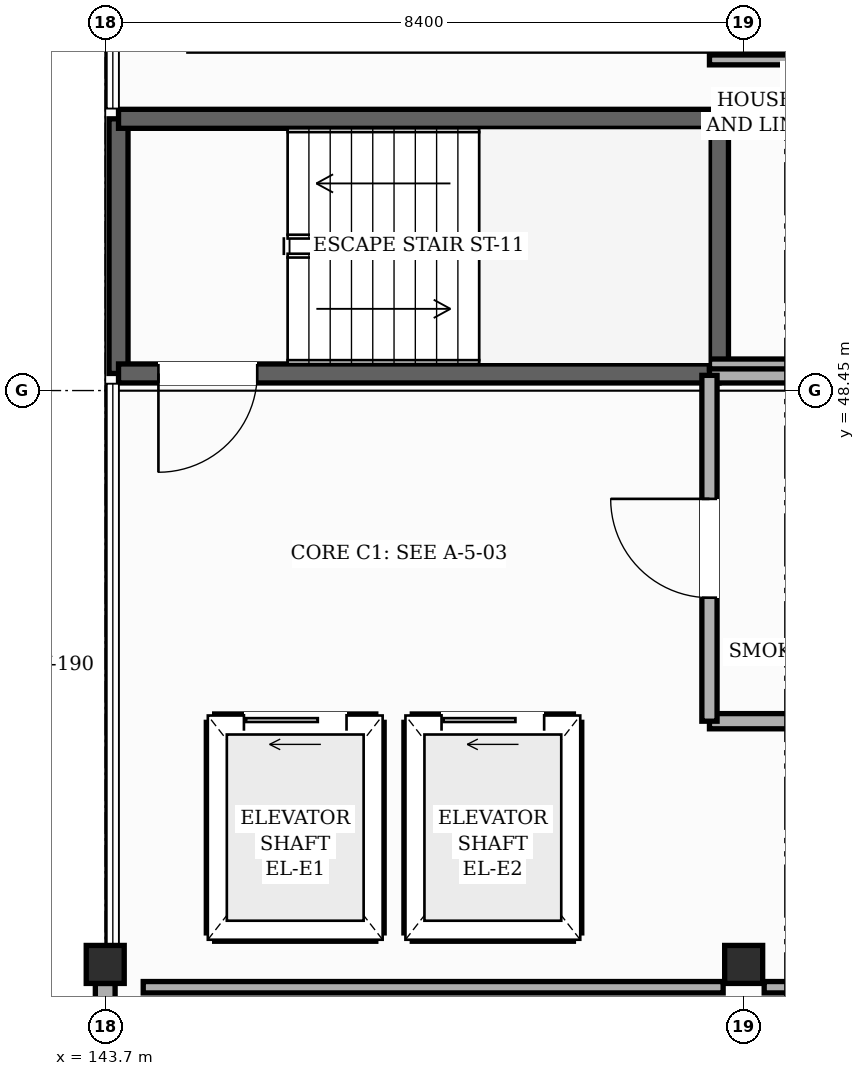
"""IFC4 building model, lengths in metres.
Left out: names, types, materials, properties, quantities, classifications, styles, units other than length and angle.
Written with IfcOpenShell. Run it as: python <this file> out.ifc"""

import sys

from ifc_helpers import new_model, si_unit, direction, frame, frame_2d, origin, origin_2d, place, context, subcontext, project, spatial, rectangle, hollow_rectangle, extrude, element, fill, save


model = new_model("IFC4")
c1 = context("Model", 3, precision=1e-05, world=origin(), true_north=direction((0.0, 1.0)))
c2 = subcontext(c1, "Body", "Model", "MODEL_VIEW")
j1 = project(units=[si_unit("LENGTHUNIT", "METRE"), si_unit("PLANEANGLEUNIT", "RADIAN")], contexts=[c1])
p1 = place(None, origin())
s1 = spatial("IfcSite", under=j1, at=p1, CompositionType="ELEMENT")
p2 = place(p1, origin())
s2 = spatial("IfcBuilding", under=s1, at=p2, CompositionType="ELEMENT")
p3 = place(p2, frame((0.0, 0.0, 39.0)))
s3 = spatial("IfcBuildingStorey", under=s2, at=p3, CompositionType="ELEMENT", Elevation=39.0)
for number, where, z_axis, x_axis in (
    (1, (143.7, 40.9, 0.0), (0.0, 0.0, 1.0), (1.0, 0.0, 0.0)),
    (2, (152.1, 40.9, 0.0), (0.0, 0.0, 1.0), (1.0, 0.0, 0.0)),
):
    element("IfcColumn", number, at=place(p3, frame(where, z_axis=z_axis, x_axis=x_axis)), inside=s3, PredefinedType="COLUMN", context=c2, shape_type="SweptSolid", body=[
        extrude(hollow_rectangle(XDim=0.5, YDim=0.5, WallThickness=0.022, InnerFilletRadius=0.022, OuterFilletRadius=0.044, at=origin_2d()), origin(), (0.0, 0.0, 1.0), 3.6),
    ])
p4 = place(p3, frame((143.7, 32.25, 0.0), z_axis=(0.0, 0.0, 1.0), x_axis=(0.0, 1.0, 0.0)))
e3 = element("IfcWall", 3, at=p4, inside=s3, PredefinedType="SOLIDWALL", context=c2, shape_type="SweptSolid", body=[
    extrude(rectangle(XDim=8.4, YDim=0.26, at=frame_2d((4.2, 0.0))), origin(), (0.0, 0.0, 1.0), 2.655),
])
p5 = place(p4, frame((0.35, 0.0, 0.85)))
e4 = element("IfcOpeningElement", 4, at=p5, cuts=e3, PredefinedType="OPENING", context=c2, shape_type="SweptSolid", body=[
    extrude(rectangle(XDim=0.85, YDim=1.35, at=frame_2d((0.425, 0.675))), frame((0.0, 0.14, 0.0), z_axis=(0.0, -1.0, 0.0), x_axis=(1.0, 0.0, 0.0)), (0.0, 0.0, 1.0), 0.28),
])
p6 = place(p4, frame((2.375, 0.0, 0.85)))
e5 = element("IfcOpeningElement", 5, at=p6, cuts=e3, PredefinedType="OPENING", context=c2, shape_type="SweptSolid", body=[
    extrude(rectangle(XDim=1.75, YDim=1.35, at=frame_2d((0.875, 0.675))), frame((0.0, 0.14, 0.0), z_axis=(0.0, -1.0, 0.0), x_axis=(1.0, 0.0, 0.0)), (0.0, 0.0, 1.0), 0.28),
])
p7 = place(p4, frame((5.675, 0.0, 0.85)))
e6 = element("IfcOpeningElement", 6, at=p7, cuts=e3, PredefinedType="OPENING", context=c2, shape_type="SweptSolid", body=[
    extrude(rectangle(XDim=1.95, YDim=1.35, at=frame_2d((0.975, 0.675))), frame((0.0, 0.14, 0.0), z_axis=(0.0, -1.0, 0.0), x_axis=(1.0, 0.0, 0.0)), (0.0, 0.0, 1.0), 0.28),
])
for number, where, z_axis, x_axis in (
    (7, (143.875, 48.675, 0.0), (0.0, 0.0, 1.0), (0.0, 1.0, 0.0)),
    (8, (151.775, 52.025, 0.0), (0.0, 0.0, 1.0), (0.0, -1.0, 0.0)),
):
    element("IfcWall", number, at=place(p3, frame(where, z_axis=z_axis, x_axis=x_axis)), inside=s3, PredefinedType="SHEAR", context=c2, shape_type="SweptSolid", body=[
        extrude(rectangle(XDim=3.35, YDim=0.25, at=frame_2d((1.675, 0.0))), origin(), (0.0, 0.0, 1.0), 3.38),
    ])
p8 = place(p3, frame((151.775, 48.675, 0.0), z_axis=(0.0, 0.0, 1.0), x_axis=(-1.0, 0.0, 0.0)))
e9 = element("IfcWall", 9, at=p8, inside=s3, PredefinedType="SHEAR", context=c2, shape_type="SweptSolid", body=[
    extrude(rectangle(XDim=7.9, YDim=0.25, at=frame_2d((3.95, 0.0))), origin(), (0.0, 0.0, 1.0), 3.38),
])
p9 = place(p8, frame((6.075, 0.0, 0.0)))
e10 = element("IfcOpeningElement", 10, at=p9, cuts=e9, PredefinedType="OPENING", context=c2, shape_type="SweptSolid", body=[
    extrude(rectangle(XDim=1.3, YDim=2.2, at=frame_2d((0.65, 1.1))), frame((0.0, 0.135, 0.0), z_axis=(0.0, -1.0, 0.0), x_axis=(1.0, 0.0, 0.0)), (0.0, 0.0, 1.0), 0.27),
])
p10 = place(p3, frame((143.875, 52.025, 0.0), z_axis=(0.0, 0.0, 1.0), x_axis=(1.0, 0.0, 0.0)))
e11 = element("IfcWall", 11, at=p10, inside=s3, PredefinedType="SHEAR", context=c2, shape_type="SweptSolid", body=[
    extrude(rectangle(XDim=7.9, YDim=0.25, at=frame_2d((3.95, 0.0))), origin(), (0.0, 0.0, 1.0), 3.38),
])
p11 = place(p3, frame((145.14, 44.085, 0.0), z_axis=(0.0, 0.0, 1.0), x_axis=(1.0, 0.0, 0.0)))
e12 = element("IfcWall", 12, at=p11, inside=s3, PredefinedType="SHEAR", context=c2, shape_type="SweptSolid", body=[
    extrude(rectangle(XDim=2.12, YDim=0.22, at=frame_2d((1.06, 0.0))), origin(), (0.0, 0.0, 1.0), 3.38),
])
p12 = place(p11, frame((0.385, 0.0, 0.0)))
e13 = element("IfcOpeningElement", 13, at=p12, cuts=e12, PredefinedType="OPENING", context=c2, shape_type="SweptSolid", body=[
    extrude(rectangle(XDim=1.35, YDim=2.3, at=frame_2d((0.675, 1.15))), frame((0.0, 0.12, 0.0), z_axis=(0.0, -1.0, 0.0), x_axis=(1.0, 0.0, 0.0)), (0.0, 0.0, 1.0), 0.24),
])
p13 = place(p3, frame((145.14, 41.315, 0.0), z_axis=(0.0, 0.0, 1.0), x_axis=(1.0, 0.0, 0.0)))
e14 = element("IfcWall", 14, at=p13, inside=s3, PredefinedType="SHEAR", context=c2, shape_type="SweptSolid", body=[
    extrude(rectangle(XDim=2.12, YDim=0.22, at=frame_2d((1.06, 0.0))), origin(), (0.0, 0.0, 1.0), 3.38),
])
for number, where, z_axis, x_axis in (
    (15, (147.26, 41.315, 0.0), (0.0, 0.0, 1.0), (0.0, 1.0, 0.0)),
    (16, (145.14, 41.315, 0.0), (0.0, 0.0, 1.0), (0.0, 1.0, 0.0)),
):
    element("IfcWall", number, at=place(p3, frame(where, z_axis=z_axis, x_axis=x_axis)), inside=s3, PredefinedType="SHEAR", context=c2, shape_type="SweptSolid", body=[
        extrude(rectangle(XDim=2.77, YDim=0.22, at=frame_2d((1.385, 0.0))), origin(), (0.0, 0.0, 1.0), 3.38),
    ])
p14 = place(p3, frame((147.74, 44.085, 0.0), z_axis=(0.0, 0.0, 1.0), x_axis=(1.0, 0.0, 0.0)))
e17 = element("IfcWall", 17, at=p14, inside=s3, PredefinedType="SHEAR", context=c2, shape_type="SweptSolid", body=[
    extrude(rectangle(XDim=2.12, YDim=0.22, at=frame_2d((1.06, 0.0))), origin(), (0.0, 0.0, 1.0), 3.38),
])
p15 = place(p14, frame((0.385, 0.0, 0.0)))
e18 = element("IfcOpeningElement", 18, at=p15, cuts=e17, PredefinedType="OPENING", context=c2, shape_type="SweptSolid", body=[
    extrude(rectangle(XDim=1.35, YDim=2.3, at=frame_2d((0.675, 1.15))), frame((0.0, 0.12, 0.0), z_axis=(0.0, -1.0, 0.0), x_axis=(1.0, 0.0, 0.0)), (0.0, 0.0, 1.0), 0.24),
])
p16 = place(p3, frame((147.74, 41.315, 0.0), z_axis=(0.0, 0.0, 1.0), x_axis=(1.0, 0.0, 0.0)))
e19 = element("IfcWall", 19, at=p16, inside=s3, PredefinedType="SHEAR", context=c2, shape_type="SweptSolid", body=[
    extrude(rectangle(XDim=2.12, YDim=0.22, at=frame_2d((1.06, 0.0))), origin(), (0.0, 0.0, 1.0), 3.38),
])
for number, where, z_axis, x_axis in (
    (20, (149.86, 41.315, 0.0), (0.0, 0.0, 1.0), (0.0, 1.0, 0.0)),
    (21, (147.74, 41.315, 0.0), (0.0, 0.0, 1.0), (0.0, 1.0, 0.0)),
):
    element("IfcWall", number, at=place(p3, frame(where, z_axis=z_axis, x_axis=x_axis)), inside=s3, PredefinedType="SHEAR", context=c2, shape_type="SweptSolid", body=[
        extrude(rectangle(XDim=2.77, YDim=0.22, at=frame_2d((1.385, 0.0))), origin(), (0.0, 0.0, 1.0), 3.38),
    ])
p17 = place(p3, frame((144.2, 40.6, 0.0), z_axis=(0.0, 0.0, 1.0), x_axis=(1.0, 0.0, 0.0)))
e22 = element("IfcWall", 22, at=p17, inside=s3, PredefinedType="PARTITIONING", context=c2, shape_type="SweptSolid", body=[
    extrude(rectangle(XDim=7.63, YDim=0.15, at=frame_2d((3.815, 0.0))), origin(), (0.0, 0.0, 1.0), 2.755),
])
p18 = place(p3, frame((152.37, 40.6, 0.0), z_axis=(0.0, 0.0, 1.0), x_axis=(1.0, 0.0, 0.0)))
e23 = element("IfcWall", 23, at=p18, inside=s3, PredefinedType="PARTITIONING", context=c2, shape_type="SweptSolid", body=[
    extrude(rectangle(XDim=2.83, YDim=0.15, at=frame_2d((1.415, 0.0))), origin(), (0.0, 0.0, 1.0), 2.755),
])
for number, where, z_axis, x_axis in (
    (24, (151.65, 44.1, 0.0), (0.0, 0.0, 1.0), (1.0, 0.0, 0.0)),
    (25, (151.65, 48.65, 0.0), (0.0, 0.0, 1.0), (1.0, 0.0, 0.0)),
):
    element("IfcWall", number, at=place(p3, frame(where, z_axis=z_axis, x_axis=x_axis)), inside=s3, PredefinedType="SOLIDWALL", context=c2, shape_type="SweptSolid", body=[
        extrude(rectangle(XDim=3.55, YDim=0.2, at=frame_2d((1.775, 0.0))), origin(), (0.0, 0.0, 1.0), 3.365),
    ])
for number, where, z_axis, x_axis in (
    (26, (151.65, 48.8, 0.0), (0.0, 0.0, 1.0), (1.0, 0.0, 0.0)),
    (27, (151.65, 52.8, 0.0), (0.0, 0.0, 1.0), (1.0, 0.0, 0.0)),
):
    element("IfcWall", number, at=place(p3, frame(where, z_axis=z_axis, x_axis=x_axis)), inside=s3, PredefinedType="PARTITIONING", context=c2, shape_type="SweptSolid", body=[
        extrude(rectangle(XDim=3.55, YDim=0.13, at=frame_2d((1.775, 0.0))), origin(), (0.0, 0.0, 1.0), 3.365),
    ])
p19 = place(p3, frame((151.65, 44.1, 0.0), z_axis=(0.0, 0.0, 1.0), x_axis=(0.0, 1.0, 0.0)))
e28 = element("IfcWall", 28, at=p19, inside=s3, PredefinedType="SOLIDWALL", context=c2, shape_type="SweptSolid", body=[
    extrude(rectangle(XDim=4.55, YDim=0.2, at=frame_2d((2.275, 0.0))), origin(), (0.0, 0.0, 1.0), 3.365),
])
p20 = place(p19, frame((1.625, 0.0, 0.0)))
e29 = element("IfcOpeningElement", 29, at=p20, cuts=e28, PredefinedType="OPENING", context=c2, shape_type="SweptSolid", body=[
    extrude(rectangle(XDim=1.3, YDim=2.2, at=frame_2d((0.65, 1.1))), frame((0.0, 0.11, 0.0), z_axis=(0.0, -1.0, 0.0), x_axis=(1.0, 0.0, 0.0)), (0.0, 0.0, 1.0), 0.22),
])
p21 = place(p9, origin())
e30 = element("IfcDoor", 30, at=p21, inside=s3, OperationType="SINGLE_SWING_RIGHT", PredefinedType="DOOR", context=c2, shape_type="SweptSolid", body=[
    extrude(rectangle(XDim=1.3, YDim=2.2, at=frame_2d((0.65, 1.1))), frame((0.0, 0.025, 0.0), z_axis=(0.0, -1.0, 0.0), x_axis=(1.0, 0.0, 0.0)), (0.0, 0.0, 1.0), 0.05),
])
fill(e10, e30)
p22 = place(p12, origin())
e31 = element("IfcDoor", 31, at=p22, inside=s3, OperationType="SLIDING_TO_LEFT", PredefinedType="DOOR", context=c2, shape_type="SweptSolid", body=[
    extrude(rectangle(XDim=1.35, YDim=2.3, at=frame_2d((0.675, 1.15))), frame((0.0, 0.025, 0.0), z_axis=(0.0, -1.0, 0.0), x_axis=(1.0, 0.0, 0.0)), (0.0, 0.0, 1.0), 0.05),
])
fill(e13, e31)
p23 = place(p15, origin())
e32 = element("IfcDoor", 32, at=p23, inside=s3, OperationType="SLIDING_TO_LEFT", PredefinedType="DOOR", context=c2, shape_type="SweptSolid", body=[
    extrude(rectangle(XDim=1.35, YDim=2.3, at=frame_2d((0.675, 1.15))), frame((0.0, 0.025, 0.0), z_axis=(0.0, -1.0, 0.0), x_axis=(1.0, 0.0, 0.0)), (0.0, 0.0, 1.0), 0.05),
])
fill(e18, e32)
p24 = place(p20, origin())
e33 = element("IfcDoor", 33, at=p24, inside=s3, OperationType="SINGLE_SWING_RIGHT", PredefinedType="DOOR", context=c2, shape_type="SweptSolid", body=[
    extrude(rectangle(XDim=1.3, YDim=2.2, at=frame_2d((0.65, 1.1))), frame((0.0, 0.025, 0.0), z_axis=(0.0, -1.0, 0.0), x_axis=(1.0, 0.0, 0.0)), (0.0, 0.0, 1.0), 0.05),
])
fill(e29, e33)
save(model, sys.argv[1])
